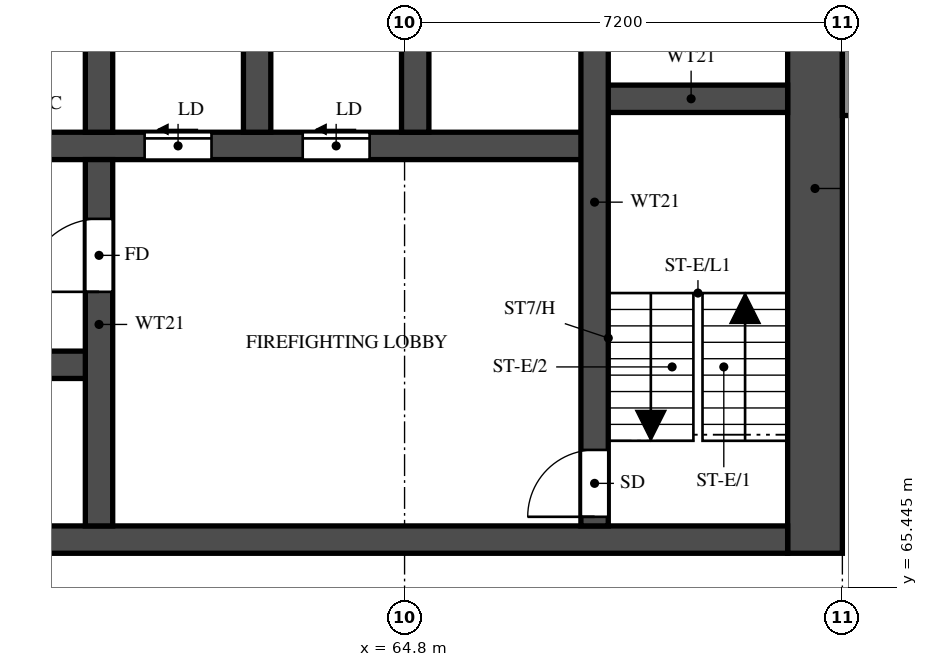
"""IFC4 building model, lengths in metres.
Left out: names, types, materials, properties, quantities, classifications, styles, units other than length and angle.
Written with IfcOpenShell. Run it as: python <this file> out.ifc"""

import sys

from ifc_helpers import new_model, si_unit, direction, frame, frame_2d, origin, place, context, subcontext, project, spatial, rectangle, extrude, element, fill, save


model = new_model("IFC4")
c1 = context("Model", 3, precision=1e-05, world=origin(), true_north=direction((0.0, 1.0)))
c2 = subcontext(c1, "Body", "Model", "MODEL_VIEW")
j1 = project(units=[si_unit("LENGTHUNIT", "METRE"), si_unit("PLANEANGLEUNIT", "RADIAN")], contexts=[c1])
p1 = place(None, origin())
s1 = spatial("IfcSite", under=j1, at=p1, CompositionType="ELEMENT")
p2 = place(p1, origin())
s2 = spatial("IfcBuilding", under=s1, at=p2, CompositionType="ELEMENT")
p3 = place(p2, frame((0.0, 0.0, 90.0)))
s3 = spatial("IfcBuildingStorey", under=s2, at=p3, CompositionType="ELEMENT", Elevation=90.0)
p4 = place(p3, frame((71.55, 66.0, 0.0), z_axis=(0.0, 0.0, 1.0), x_axis=(0.0, 1.0, 0.0)))
e1 = element("IfcWall", 1, at=p4, inside=s3, PredefinedType="SHEAR", context=c2, shape_type="SweptSolid", body=[
    extrude(rectangle(XDim=12.0, YDim=0.9, at=frame_2d((6.0, 0.0))), origin(), (0.0, 0.0, 1.0), 3.18),
])
p5 = place(p3, frame((29.7, 66.225, 0.0), z_axis=(0.0, 0.0, 1.0), x_axis=(1.0, 0.0, 0.0)))
e2 = element("IfcWall", 2, at=p5, inside=s3, PredefinedType="SHEAR", context=c2, shape_type="SweptSolid", body=[
    extrude(rectangle(XDim=41.4, YDim=0.45, at=frame_2d((20.7, 0.0))), origin(), (0.0, 0.0, 1.0), 3.18),
])
p6 = place(p5, frame((0.925, 0.0, 0.0)))
e3 = element("IfcOpeningElement", 3, at=p6, cuts=e2, PredefinedType="OPENING", context=c2, shape_type="SweptSolid", body=[
    extrude(rectangle(XDim=1.1, YDim=2.1, at=frame_2d((0.55, 1.05))), frame((0.0, 0.235, 0.0), z_axis=(0.0, -1.0, 0.0), x_axis=(1.0, 0.0, 0.0)), (0.0, 0.0, 1.0), 0.47),
])
p7 = place(p5, frame((3.738, 0.0, 0.0)))
e4 = element("IfcOpeningElement", 4, at=p7, cuts=e2, PredefinedType="OPENING", context=c2, shape_type="SweptSolid", body=[
    extrude(rectangle(XDim=1.8, YDim=2.1, at=frame_2d((0.9, 1.05))), frame((0.0, 0.235, 0.0), z_axis=(0.0, -1.0, 0.0), x_axis=(1.0, 0.0, 0.0)), (0.0, 0.0, 1.0), 0.47),
])
p8 = place(p3, frame((35.575, 69.1, 0.0), z_axis=(0.0, 0.0, 1.0), x_axis=(1.0, 0.0, 0.0)))
e5 = element("IfcWall", 5, at=p8, inside=s3, PredefinedType="SHEAR", context=c2, shape_type="SweptSolid", body=[
    extrude(rectangle(XDim=24.2, YDim=0.45, at=frame_2d((12.1, 0.0))), origin(), (0.0, 0.0, 1.0), 3.18),
])
p9 = place(p8, frame((1.05, 0.0, 0.0)))
e6 = element("IfcOpeningElement", 6, at=p9, cuts=e5, PredefinedType="OPENING", context=c2, shape_type="SweptSolid", body=[
    extrude(rectangle(XDim=1.1, YDim=2.1, at=frame_2d((0.55, 1.05))), frame((0.0, 0.235, 0.0), z_axis=(0.0, -1.0, 0.0), x_axis=(1.0, 0.0, 0.0)), (0.0, 0.0, 1.0), 0.47),
])
p10 = place(p8, frame((3.8, 0.0, 0.0)))
e7 = element("IfcOpeningElement", 7, at=p10, cuts=e5, PredefinedType="OPENING", context=c2, shape_type="SweptSolid", body=[
    extrude(rectangle(XDim=1.1, YDim=2.1, at=frame_2d((0.55, 1.05))), frame((0.0, 0.235, 0.0), z_axis=(0.0, -1.0, 0.0), x_axis=(1.0, 0.0, 0.0)), (0.0, 0.0, 1.0), 0.47),
])
p11 = place(p8, frame((6.55, 0.0, 0.0)))
e8 = element("IfcOpeningElement", 8, at=p11, cuts=e5, PredefinedType="OPENING", context=c2, shape_type="SweptSolid", body=[
    extrude(rectangle(XDim=1.1, YDim=2.1, at=frame_2d((0.55, 1.05))), frame((0.0, 0.235, 0.0), z_axis=(0.0, -1.0, 0.0), x_axis=(1.0, 0.0, 0.0)), (0.0, 0.0, 1.0), 0.47),
])
p12 = place(p8, frame((9.3, 0.0, 0.0)))
e9 = element("IfcOpeningElement", 9, at=p12, cuts=e5, PredefinedType="OPENING", context=c2, shape_type="SweptSolid", body=[
    extrude(rectangle(XDim=1.1, YDim=2.1, at=frame_2d((0.55, 1.05))), frame((0.0, 0.235, 0.0), z_axis=(0.0, -1.0, 0.0), x_axis=(1.0, 0.0, 0.0)), (0.0, 0.0, 1.0), 0.47),
])
p13 = place(p8, frame((12.05, 0.0, 0.0)))
e10 = element("IfcOpeningElement", 10, at=p13, cuts=e5, PredefinedType="OPENING", context=c2, shape_type="SweptSolid", body=[
    extrude(rectangle(XDim=1.1, YDim=2.1, at=frame_2d((0.55, 1.05))), frame((0.0, 0.235, 0.0), z_axis=(0.0, -1.0, 0.0), x_axis=(1.0, 0.0, 0.0)), (0.0, 0.0, 1.0), 0.47),
])
p14 = place(p8, frame((14.8, 0.0, 0.0)))
e11 = element("IfcOpeningElement", 11, at=p14, cuts=e5, PredefinedType="OPENING", context=c2, shape_type="SweptSolid", body=[
    extrude(rectangle(XDim=1.1, YDim=2.1, at=frame_2d((0.55, 1.05))), frame((0.0, 0.235, 0.0), z_axis=(0.0, -1.0, 0.0), x_axis=(1.0, 0.0, 0.0)), (0.0, 0.0, 1.0), 0.47),
])
p15 = place(p3, frame((32.875, 72.7, 0.0), z_axis=(0.0, 0.0, 1.0), x_axis=(1.0, 0.0, 0.0)))
e12 = element("IfcWall", 12, at=p15, inside=s3, PredefinedType="SHEAR", context=c2, shape_type="SweptSolid", body=[
    extrude(rectangle(XDim=35.05, YDim=0.45, at=frame_2d((17.525, 0.0))), origin(), (0.0, 0.0, 1.0), 3.18),
])
p16 = place(p15, frame((19.8, 0.0, 0.0)))
e13 = element("IfcOpeningElement", 13, at=p16, cuts=e12, PredefinedType="OPENING", context=c2, shape_type="SweptSolid", body=[
    extrude(rectangle(XDim=1.1, YDim=2.1, at=frame_2d((0.55, 1.05))), frame((0.0, 0.235, 0.0), z_axis=(0.0, -1.0, 0.0), x_axis=(1.0, 0.0, 0.0)), (0.0, 0.0, 1.0), 0.47),
])
p17 = place(p15, frame((27.65, 0.0, 0.0)))
e14 = element("IfcOpeningElement", 14, at=p17, cuts=e12, PredefinedType="OPENING", context=c2, shape_type="SweptSolid", body=[
    extrude(rectangle(XDim=1.1, YDim=2.1, at=frame_2d((0.55, 1.05))), frame((0.0, 0.235, 0.0), z_axis=(0.0, -1.0, 0.0), x_axis=(1.0, 0.0, 0.0)), (0.0, 0.0, 1.0), 0.47),
])
p18 = place(p15, frame((30.25, 0.0, 0.0)))
e15 = element("IfcOpeningElement", 15, at=p18, cuts=e12, PredefinedType="OPENING", context=c2, shape_type="SweptSolid", body=[
    extrude(rectangle(XDim=1.1, YDim=2.1, at=frame_2d((0.55, 1.05))), frame((0.0, 0.235, 0.0), z_axis=(0.0, -1.0, 0.0), x_axis=(1.0, 0.0, 0.0)), (0.0, 0.0, 1.0), 0.47),
])
p19 = place(p15, frame((3.75, 0.0, 0.0)))
e16 = element("IfcOpeningElement", 16, at=p19, cuts=e12, PredefinedType="OPENING", context=c2, shape_type="SweptSolid", body=[
    extrude(rectangle(XDim=1.1, YDim=2.1, at=frame_2d((0.55, 1.05))), frame((0.0, 0.235, 0.0), z_axis=(0.0, -1.0, 0.0), x_axis=(1.0, 0.0, 0.0)), (0.0, 0.0, 1.0), 0.47),
])
p20 = place(p15, frame((6.5, 0.0, 0.0)))
e17 = element("IfcOpeningElement", 17, at=p20, cuts=e12, PredefinedType="OPENING", context=c2, shape_type="SweptSolid", body=[
    extrude(rectangle(XDim=1.1, YDim=2.1, at=frame_2d((0.55, 1.05))), frame((0.0, 0.235, 0.0), z_axis=(0.0, -1.0, 0.0), x_axis=(1.0, 0.0, 0.0)), (0.0, 0.0, 1.0), 0.47),
])
p21 = place(p15, frame((9.25, 0.0, 0.0)))
e18 = element("IfcOpeningElement", 18, at=p21, cuts=e12, PredefinedType="OPENING", context=c2, shape_type="SweptSolid", body=[
    extrude(rectangle(XDim=1.1, YDim=2.1, at=frame_2d((0.55, 1.05))), frame((0.0, 0.235, 0.0), z_axis=(0.0, -1.0, 0.0), x_axis=(1.0, 0.0, 0.0)), (0.0, 0.0, 1.0), 0.47),
])
p22 = place(p15, frame((12.0, 0.0, 0.0)))
e19 = element("IfcOpeningElement", 19, at=p22, cuts=e12, PredefinedType="OPENING", context=c2, shape_type="SweptSolid", body=[
    extrude(rectangle(XDim=1.1, YDim=2.1, at=frame_2d((0.55, 1.05))), frame((0.0, 0.235, 0.0), z_axis=(0.0, -1.0, 0.0), x_axis=(1.0, 0.0, 0.0)), (0.0, 0.0, 1.0), 0.47),
])
p23 = place(p15, frame((14.75, 0.0, 0.0)))
e20 = element("IfcOpeningElement", 20, at=p23, cuts=e12, PredefinedType="OPENING", context=c2, shape_type="SweptSolid", body=[
    extrude(rectangle(XDim=1.1, YDim=2.1, at=frame_2d((0.55, 1.05))), frame((0.0, 0.235, 0.0), z_axis=(0.0, -1.0, 0.0), x_axis=(1.0, 0.0, 0.0)), (0.0, 0.0, 1.0), 0.47),
])
p24 = place(p15, frame((17.5, 0.0, 0.0)))
e21 = element("IfcOpeningElement", 21, at=p24, cuts=e12, PredefinedType="OPENING", context=c2, shape_type="SweptSolid", body=[
    extrude(rectangle(XDim=1.1, YDim=2.1, at=frame_2d((0.55, 1.05))), frame((0.0, 0.235, 0.0), z_axis=(0.0, -1.0, 0.0), x_axis=(1.0, 0.0, 0.0)), (0.0, 0.0, 1.0), 0.47),
])
p25 = place(p15, frame((0.913, 0.0, 0.0)))
e22 = element("IfcOpeningElement", 22, at=p25, cuts=e12, PredefinedType="OPENING", context=c2, shape_type="SweptSolid", body=[
    extrude(rectangle(XDim=1.1, YDim=2.1, at=frame_2d((0.55, 1.05))), frame((0.0, 0.235, 0.0), z_axis=(0.0, -1.0, 0.0), x_axis=(1.0, 0.0, 0.0)), (0.0, 0.0, 1.0), 0.47),
])
p26 = place(p3, frame((67.925, 73.475, 0.0), z_axis=(0.0, 0.0, 1.0), x_axis=(1.0, 0.0, 0.0)))
e23 = element("IfcWall", 23, at=p26, inside=s3, PredefinedType="SHEAR", context=c2, shape_type="SweptSolid", body=[
    extrude(rectangle(XDim=3.175, YDim=0.45, at=frame_2d((1.587, 0.0))), origin(), (0.0, 0.0, 1.0), 3.18),
])
p27 = place(p3, frame((67.925, 66.45, 0.0), z_axis=(0.0, 0.0, 1.0), x_axis=(0.0, 1.0, 0.0)))
e24 = element("IfcWall", 24, at=p27, inside=s3, PredefinedType="SHEAR", context=c2, shape_type="SweptSolid", body=[
    extrude(rectangle(XDim=10.65, YDim=0.45, at=frame_2d((5.325, 0.0))), origin(), (0.0, 0.0, 1.0), 3.18),
])
p28 = place(p27, frame((0.15, 0.0, 0.0)))
e25 = element("IfcOpeningElement", 25, at=p28, cuts=e24, PredefinedType="OPENING", context=c2, shape_type="SweptSolid", body=[
    extrude(rectangle(XDim=1.1, YDim=2.1, at=frame_2d((0.55, 1.05))), frame((0.0, 0.235, 0.0), z_axis=(0.0, -1.0, 0.0), x_axis=(1.0, 0.0, 0.0)), (0.0, 0.0, 1.0), 0.47),
])
p29 = place(p3, frame((59.775, 66.45, 0.0), z_axis=(0.0, 0.0, 1.0), x_axis=(0.0, 1.0, 0.0)))
e26 = element("IfcWall", 26, at=p29, inside=s3, PredefinedType="SHEAR", context=c2, shape_type="SweptSolid", body=[
    extrude(rectangle(XDim=6.025, YDim=0.45, at=frame_2d((3.013, 0.0))), origin(), (0.0, 0.0, 1.0), 3.18),
])
p30 = place(p29, frame((3.85, 0.0, 0.0)))
e27 = element("IfcOpeningElement", 27, at=p30, cuts=e26, PredefinedType="OPENING", context=c2, shape_type="SweptSolid", body=[
    extrude(rectangle(XDim=1.2, YDim=2.1, at=frame_2d((0.6, 1.05))), frame((0.0, 0.235, 0.0), z_axis=(0.0, -1.0, 0.0), x_axis=(1.0, 0.0, 0.0)), (0.0, 0.0, 1.0), 0.47),
])
for number, where, z_axis, x_axis in (
    (28, (59.775, 72.925, 0.0), (0.0, 0.0, 1.0), (0.0, 1.0, 0.0)),
    (29, (62.375, 72.925, 0.0), (0.0, 0.0, 1.0), (0.0, 1.0, 0.0)),
    (30, (64.975, 72.925, 0.0), (0.0, 0.0, 1.0), (0.0, 1.0, 0.0)),
):
    element("IfcWall", number, at=place(p3, frame(where, z_axis=z_axis, x_axis=x_axis)), inside=s3, PredefinedType="SHEAR", context=c2, shape_type="SweptSolid", body=[
        extrude(rectangle(XDim=2.95, YDim=0.45, at=frame_2d((1.475, 0.0))), origin(), (0.0, 0.0, 1.0), 3.18),
    ])
p31 = place(p3, frame((72.1, 73.2, 0.0), z_axis=(0.0, 0.0, 1.0), x_axis=(0.0, 1.0, 0.0)))
e31 = element("IfcWall", 31, at=p31, inside=s3, PredefinedType="SOLIDWALL", context=c2, shape_type="SweptSolid", body=[
    extrude(rectangle(XDim=4.8, YDim=0.2, at=frame_2d((2.4, 0.0))), origin(), (0.0, 0.0, 1.0), 3.18),
])
p32 = place(p28, origin())
e32 = element("IfcDoor", 32, at=p32, inside=s3, OperationType="SINGLE_SWING_LEFT", PredefinedType="DOOR", context=c2, shape_type="SweptSolid", body=[
    extrude(rectangle(XDim=1.1, YDim=2.1, at=frame_2d((0.55, 1.05))), frame((0.0, 0.025, 0.0), z_axis=(0.0, -1.0, 0.0), x_axis=(1.0, 0.0, 0.0)), (0.0, 0.0, 1.0), 0.05),
])
fill(e25, e32)
p33 = place(p30, origin())
e33 = element("IfcDoor", 33, at=p33, inside=s3, OperationType="SINGLE_SWING_RIGHT", PredefinedType="DOOR", context=c2, shape_type="SweptSolid", body=[
    extrude(rectangle(XDim=1.2, YDim=2.1, at=frame_2d((0.6, 1.05))), frame((0.0, 0.025, 0.0), z_axis=(0.0, -1.0, 0.0), x_axis=(1.0, 0.0, 0.0)), (0.0, 0.0, 1.0), 0.05),
])
fill(e27, e33)
p34 = place(p17, origin())
e34 = element("IfcDoor", 34, at=p34, inside=s3, OperationType="SLIDING_TO_LEFT", PredefinedType="DOOR", context=c2, shape_type="SweptSolid", body=[
    extrude(rectangle(XDim=1.1, YDim=2.1, at=frame_2d((0.55, 1.05))), frame((0.0, 0.025, 0.0), z_axis=(0.0, -1.0, 0.0), x_axis=(1.0, 0.0, 0.0)), (0.0, 0.0, 1.0), 0.05),
])
fill(e14, e34)
p35 = place(p18, origin())
e35 = element("IfcDoor", 35, at=p35, inside=s3, OperationType="SLIDING_TO_LEFT", PredefinedType="DOOR", context=c2, shape_type="SweptSolid", body=[
    extrude(rectangle(XDim=1.1, YDim=2.1, at=frame_2d((0.55, 1.05))), frame((0.0, 0.025, 0.0), z_axis=(0.0, -1.0, 0.0), x_axis=(1.0, 0.0, 0.0)), (0.0, 0.0, 1.0), 0.05),
])
fill(e15, e35)
save(model, sys.argv[1])
